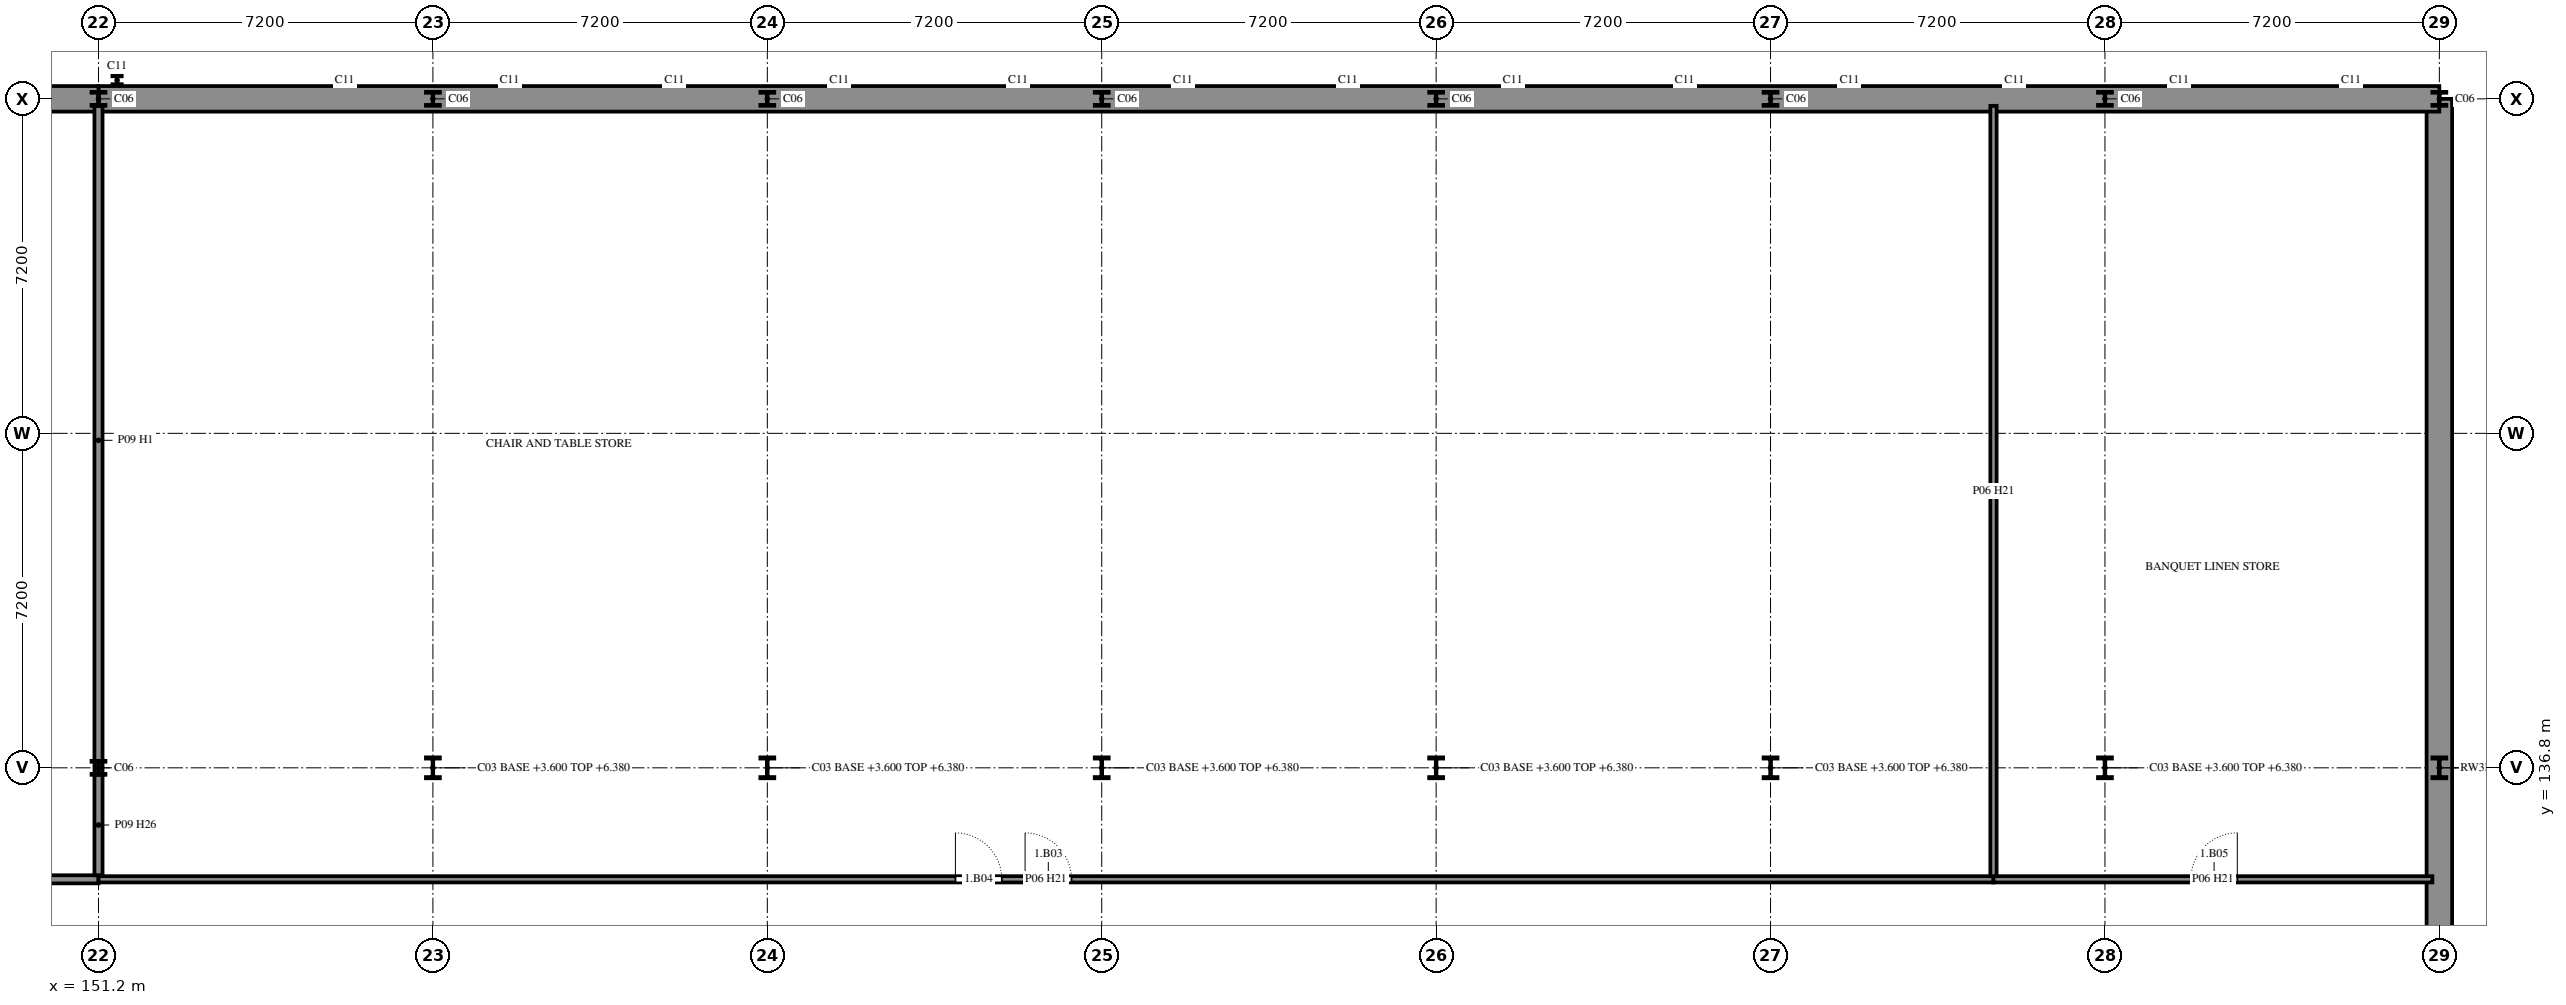
"""IFC4 building model, lengths in metres.
Left out: names, types, materials, properties, quantities, classifications, styles, units other than length and angle.
Written with IfcOpenShell. Run it as: python <this file> out.ifc"""

import sys

from ifc_helpers import new_model, si_unit, direction, frame, frame_2d, origin, origin_2d, place, context, subcontext, project, spatial, rectangle, i_section, extrude, element, fill, save


model = new_model("IFC4")
c1 = context("Model", 3, precision=1e-05, world=origin(), true_north=direction((0.0, 1.0)))
c2 = subcontext(c1, "Body", "Model", "MODEL_VIEW")
j1 = project(units=[si_unit("LENGTHUNIT", "METRE"), si_unit("PLANEANGLEUNIT", "RADIAN")], contexts=[c1])
p1 = place(None, origin())
s1 = spatial("IfcSite", under=j1, at=p1, CompositionType="ELEMENT")
p2 = place(p1, origin())
s2 = spatial("IfcBuilding", under=s1, at=p2, CompositionType="ELEMENT")
p3 = place(p2, frame((0.0, 0.0, 3.6)))
s3 = spatial("IfcBuildingStorey", under=s2, at=p3, CompositionType="ELEMENT", Elevation=3.6)
for number, where, z_axis, x_axis in (
    (1, (151.2, 151.2, 0.0), (0.0, 0.0, 1.0), (1.0, 0.0, 0.0)),
    (2, (158.4, 151.2, 0.0), (0.0, 0.0, 1.0), (1.0, 0.0, 0.0)),
    (3, (165.6, 151.2, 0.0), (0.0, 0.0, 1.0), (1.0, 0.0, 0.0)),
    (4, (172.8, 151.2, 0.0), (0.0, 0.0, 1.0), (1.0, 0.0, 0.0)),
    (5, (180.0, 151.2, 0.0), (0.0, 0.0, 1.0), (1.0, 0.0, 0.0)),
    (6, (187.2, 151.2, 0.0), (0.0, 0.0, 1.0), (1.0, 0.0, 0.0)),
    (7, (194.4, 151.2, 0.0), (0.0, 0.0, 1.0), (1.0, 0.0, 0.0)),
    (8, (201.6, 151.2, 0.0), (0.0, 0.0, 1.0), (1.0, 0.0, 0.0)),
    (9, (151.2, 136.8, 0.0), (0.0, 0.0, 1.0), (1.0, 0.0, 0.0)),
):
    element("IfcColumn", number, at=place(p3, frame(where, z_axis=z_axis, x_axis=x_axis)), inside=s3, PredefinedType="COLUMN", context=c2, shape_type="SweptSolid", body=[
        extrude(i_section(OverallWidth=0.3, OverallDepth=0.3, WebThickness=0.011, FlangeThickness=0.019, FilletRadius=0.027, at=origin_2d()), origin(), (0.0, 0.0, 1.0), 3.6),
    ])
for number, where, z_axis, x_axis in (
    (10, (158.4, 136.8, 0.0), (0.0, 0.0, 1.0), (1.0, 0.0, 0.0)),
    (11, (165.6, 136.8, 0.0), (0.0, 0.0, 1.0), (1.0, 0.0, 0.0)),
    (12, (172.8, 136.8, 0.0), (0.0, 0.0, 1.0), (1.0, 0.0, 0.0)),
    (13, (180.0, 136.8, 0.0), (0.0, 0.0, 1.0), (1.0, 0.0, 0.0)),
    (14, (187.2, 136.8, 0.0), (0.0, 0.0, 1.0), (1.0, 0.0, 0.0)),
    (15, (194.4, 136.8, 0.0), (0.0, 0.0, 1.0), (1.0, 0.0, 0.0)),
    (16, (201.6, 136.8, 0.0), (0.0, 0.0, 1.0), (1.0, 0.0, 0.0)),
):
    element("IfcColumn", number, at=place(p3, frame(where, z_axis=z_axis, x_axis=x_axis)), inside=s3, PredefinedType="COLUMN", context=c2, shape_type="SweptSolid", body=[
        extrude(i_section(OverallWidth=0.3, OverallDepth=0.45, WebThickness=0.014, FlangeThickness=0.026, FilletRadius=0.027, at=origin_2d()), origin(), (0.0, 0.0, 1.0), 2.78),
    ])
p4 = place(p3, frame((201.6, 122.4, 0.0), z_axis=(0.0, 0.0, 1.0), x_axis=(0.0, 1.0, 0.0)))
e17 = element("IfcWall", 17, at=p4, inside=s3, PredefinedType="SOLIDWALL", context=c2, shape_type="SweptSolid", body=[
    extrude(rectangle(XDim=28.8, YDim=0.55, at=frame_2d((14.4, 0.0))), origin(), (0.0, 0.0, 1.0), 3.6),
])
p5 = place(p3, frame((151.2, 151.2, 0.0), z_axis=(0.0, 0.0, 1.0), x_axis=(1.0, 0.0, 0.0)))
e18 = element("IfcWall", 18, at=p5, inside=s3, PredefinedType="SOLIDWALL", context=c2, shape_type="SweptSolid", body=[
    extrude(rectangle(XDim=50.4, YDim=0.55, at=frame_2d((25.2, 0.0))), origin(), (0.0, 0.0, 1.0), 3.6),
])
p6 = place(p3, frame((143.1, 151.2, 0.0), z_axis=(0.0, 0.0, 1.0), x_axis=(1.0, 0.0, 0.0)))
e19 = element("IfcWall", 19, at=p6, inside=s3, PredefinedType="SOLIDWALL", context=c2, shape_type="SweptSolid", body=[
    extrude(rectangle(XDim=8.1, YDim=0.55, at=frame_2d((4.05, 0.0))), origin(), (0.0, 0.0, 1.0), 3.6),
])
for number, where, z_axis, x_axis in (
    (20, (151.6, 151.6, 0.0), (0.0, 0.0, 1.0), (1.0, 0.0, 0.0)),
    (21, (156.5, 151.6, 0.0), (0.0, 0.0, 1.0), (1.0, 0.0, 0.0)),
    (22, (160.05, 151.6, 0.0), (0.0, 0.0, 1.0), (1.0, 0.0, 0.0)),
    (23, (163.6, 151.6, 0.0), (0.0, 0.0, 1.0), (1.0, 0.0, 0.0)),
    (24, (167.15, 151.6, 0.0), (0.0, 0.0, 1.0), (1.0, 0.0, 0.0)),
    (25, (171.0, 151.6, 0.0), (0.0, 0.0, 1.0), (1.0, 0.0, 0.0)),
    (26, (174.55, 151.6, 0.0), (0.0, 0.0, 1.0), (1.0, 0.0, 0.0)),
    (27, (178.1, 151.6, 0.0), (0.0, 0.0, 1.0), (1.0, 0.0, 0.0)),
    (28, (181.65, 151.6, 0.0), (0.0, 0.0, 1.0), (1.0, 0.0, 0.0)),
    (29, (185.35, 151.6, 0.0), (0.0, 0.0, 1.0), (1.0, 0.0, 0.0)),
    (30, (188.9, 151.6, 0.0), (0.0, 0.0, 1.0), (1.0, 0.0, 0.0)),
    (31, (192.45, 151.6, 0.0), (0.0, 0.0, 1.0), (1.0, 0.0, 0.0)),
    (32, (196.0, 151.6, 0.0), (0.0, 0.0, 1.0), (1.0, 0.0, 0.0)),
    (33, (199.7, 151.6, 0.0), (0.0, 0.0, 1.0), (1.0, 0.0, 0.0)),
):
    element("IfcColumn", number, at=place(p3, frame(where, z_axis=z_axis, x_axis=x_axis)), inside=s3, PredefinedType="COLUMN", context=c2, shape_type="SweptSolid", body=[
        extrude(i_section(OverallWidth=0.2, OverallDepth=0.2, WebThickness=0.009, FlangeThickness=0.015, FilletRadius=0.018, at=origin_2d()), origin(), (0.0, 0.0, 1.0), 3.6),
    ])
p7 = place(p3, frame((136.95, 134.4, 0.0), z_axis=(0.0, 0.0, 1.0), x_axis=(1.0, 0.0, 0.0)))
e34 = element("IfcWall", 34, at=p7, inside=s3, PredefinedType="PARTITIONING", context=c2, shape_type="SweptSolid", body=[
    extrude(rectangle(XDim=14.25, YDim=0.175, at=frame_2d((7.125, 0.0))), origin(), (0.0, 0.0, 1.0), 3.38),
])
p8 = place(p7, frame((6.35, 0.0, 0.0)))
e35 = element("IfcOpeningElement", 35, at=p8, cuts=e34, PredefinedType="OPENING", context=c2, shape_type="SweptSolid", body=[
    extrude(rectangle(XDim=1.6, YDim=2.1, at=frame_2d((0.8, 1.05))), frame((0.0, 0.097, 0.0), z_axis=(0.0, -1.0, 0.0), x_axis=(1.0, 0.0, 0.0)), (0.0, 0.0, 1.0), 0.195),
])
p9 = place(p3, frame((151.2, 134.4, 0.0), z_axis=(0.0, 0.0, 1.0), x_axis=(1.0, 0.0, 0.0)))
e36 = element("IfcWall", 36, at=p9, inside=s3, PredefinedType="PARTITIONING", context=c2, shape_type="SweptSolid", body=[
    extrude(rectangle(XDim=40.8, YDim=0.135, at=frame_2d((20.4, 0.0))), origin(), (0.0, 0.0, 1.0), 3.38),
])
p10 = place(p9, frame((19.95, 0.0, 0.0)))
e37 = element("IfcOpeningElement", 37, at=p10, cuts=e36, PredefinedType="OPENING", context=c2, shape_type="SweptSolid", body=[
    extrude(rectangle(XDim=1.0, YDim=2.4, at=frame_2d((0.5, 1.2))), frame((0.0, 0.077, 0.0), z_axis=(0.0, -1.0, 0.0), x_axis=(1.0, 0.0, 0.0)), (0.0, 0.0, 1.0), 0.155),
])
p11 = place(p9, frame((18.45, 0.0, 0.0)))
e38 = element("IfcOpeningElement", 38, at=p11, cuts=e36, PredefinedType="OPENING", context=c2, shape_type="SweptSolid", body=[
    extrude(rectangle(XDim=1.0, YDim=2.4, at=frame_2d((0.5, 1.2))), frame((0.0, 0.077, 0.0), z_axis=(0.0, -1.0, 0.0), x_axis=(1.0, 0.0, 0.0)), (0.0, 0.0, 1.0), 0.155),
])
p12 = place(p3, frame((192.0, 134.4, 0.0), z_axis=(0.0, 0.0, 1.0), x_axis=(1.0, 0.0, 0.0)))
e39 = element("IfcWall", 39, at=p12, inside=s3, PredefinedType="PARTITIONING", context=c2, shape_type="SweptSolid", body=[
    extrude(rectangle(XDim=9.45, YDim=0.135, at=frame_2d((4.725, 0.0))), origin(), (0.0, 0.0, 1.0), 3.38),
])
p13 = place(p12, frame((4.25, 0.0, 0.0)))
e40 = element("IfcOpeningElement", 40, at=p13, cuts=e39, PredefinedType="OPENING", context=c2, shape_type="SweptSolid", body=[
    extrude(rectangle(XDim=1.0, YDim=2.4, at=frame_2d((0.5, 1.2))), frame((0.0, 0.077, 0.0), z_axis=(0.0, -1.0, 0.0), x_axis=(1.0, 0.0, 0.0)), (0.0, 0.0, 1.0), 0.155),
])
p14 = place(p3, frame((151.2, 151.05, 0.0), z_axis=(0.0, 0.0, 1.0), x_axis=(0.0, -1.0, 0.0)))
e41 = element("IfcWall", 41, at=p14, inside=s3, PredefinedType="PARTITIONING", context=c2, shape_type="SweptSolid", body=[
    extrude(rectangle(XDim=14.4, YDim=0.175, at=frame_2d((7.2, 0.0))), origin(), (0.0, 0.0, 1.0), 2.82),
])
p15 = place(p3, frame((192.0, 151.05, 0.0), z_axis=(0.0, 0.0, 1.0), x_axis=(0.0, -1.0, 0.0)))
e42 = element("IfcWall", 42, at=p15, inside=s3, PredefinedType="PARTITIONING", context=c2, shape_type="SweptSolid", body=[
    extrude(rectangle(XDim=16.583, YDim=0.135, at=frame_2d((8.291, 0.0))), origin(), (0.0, 0.0, 1.0), 3.38),
])
p16 = place(p3, frame((151.2, 136.65, 0.0), z_axis=(0.0, 0.0, 1.0), x_axis=(0.0, -1.0, 0.0)))
e43 = element("IfcWall", 43, at=p16, inside=s3, PredefinedType="PARTITIONING", context=c2, shape_type="SweptSolid", body=[
    extrude(rectangle(XDim=2.162, YDim=0.175, at=frame_2d((1.081, 0.0))), origin(), (0.0, 0.0, 1.0), 3.15),
])
p17 = place(p10, origin())
e44 = element("IfcDoor", 44, at=p17, inside=s3, OperationType="SINGLE_SWING_RIGHT", PredefinedType="DOOR", context=c2, shape_type="SweptSolid", body=[
    extrude(rectangle(XDim=1.0, YDim=2.4, at=frame_2d((0.5, 1.2))), frame((0.0, 0.025, 0.0), z_axis=(0.0, -1.0, 0.0), x_axis=(1.0, 0.0, 0.0)), (0.0, 0.0, 1.0), 0.05),
])
fill(e37, e44)
p18 = place(p11, origin())
e45 = element("IfcDoor", 45, at=p18, inside=s3, OperationType="SINGLE_SWING_RIGHT", PredefinedType="DOOR", context=c2, shape_type="SweptSolid", body=[
    extrude(rectangle(XDim=1.0, YDim=2.4, at=frame_2d((0.5, 1.2))), frame((0.0, 0.025, 0.0), z_axis=(0.0, -1.0, 0.0), x_axis=(1.0, 0.0, 0.0)), (0.0, 0.0, 1.0), 0.05),
])
fill(e38, e45)
p19 = place(p13, origin())
e46 = element("IfcDoor", 46, at=p19, inside=s3, OperationType="SINGLE_SWING_LEFT", PredefinedType="DOOR", context=c2, shape_type="SweptSolid", body=[
    extrude(rectangle(XDim=1.0, YDim=2.4, at=frame_2d((0.5, 1.2))), frame((0.0, 0.025, 0.0), z_axis=(0.0, -1.0, 0.0), x_axis=(1.0, 0.0, 0.0)), (0.0, 0.0, 1.0), 0.05),
])
fill(e40, e46)
save(model, sys.argv[1])
